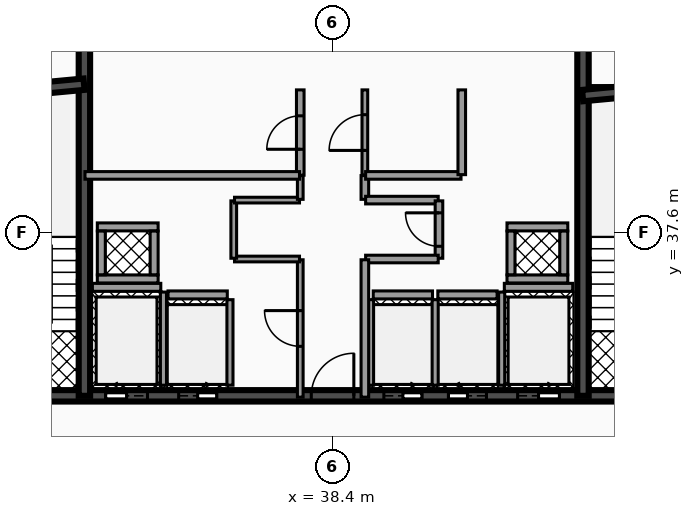
"""IFC4 building model, lengths in metres.
Left out: names, types, materials, properties, quantities, classifications, styles, units other than length and angle.
Written with IfcOpenShell. Run it as: python <this file> out.ifc"""

import sys

from ifc_helpers import new_model, si_unit, direction, frame, frame_2d, origin, place, context, subcontext, project, spatial, rectangle, extrude, element, fill, save


model = new_model("IFC4")
c1 = context("Model", 3, precision=1e-05, world=origin(), true_north=direction((0.0, 1.0)))
c2 = subcontext(c1, "Body", "Model", "MODEL_VIEW")
j1 = project(units=[si_unit("LENGTHUNIT", "METRE"), si_unit("PLANEANGLEUNIT", "RADIAN")], contexts=[c1])
p1 = place(None, origin())
s1 = spatial("IfcSite", under=j1, at=p1, CompositionType="ELEMENT")
p2 = place(p1, origin())
s2 = spatial("IfcBuilding", under=s1, at=p2, CompositionType="ELEMENT")
p3 = place(p2, frame((0.0, 0.0, 289.0)))
s3 = spatial("IfcBuildingStorey", under=s2, at=p3, CompositionType="ELEMENT", Elevation=289.0)
p4 = place(p3, frame((28.5, 33.3, 0.0), z_axis=(0.0, 0.0, 1.0), x_axis=(1.0, 0.0, 0.0)))
e1 = element("IfcWall", 1, at=p4, inside=s3, PredefinedType="SHEAR", context=c2, shape_type="SweptSolid", body=[
    extrude(rectangle(XDim=19.86, YDim=0.3, at=frame_2d((9.93, 0.0))), origin(), (0.0, 0.0, 1.0), 3.18),
])
p5 = place(p4, frame((3.93, 0.0, 0.0)))
e2 = element("IfcOpeningElement", 2, at=p5, cuts=e1, PredefinedType="OPENING", context=c2, shape_type="SweptSolid", body=[
    extrude(rectangle(XDim=1.1, YDim=2.15, at=frame_2d((0.55, 1.075))), frame((0.0, 0.16, 0.0), z_axis=(0.0, -1.0, 0.0), x_axis=(1.0, 0.0, 0.0)), (0.0, 0.0, 1.0), 0.32),
])
p6 = place(p4, frame((14.77, 0.0, 0.0)))
e3 = element("IfcOpeningElement", 3, at=p6, cuts=e1, PredefinedType="OPENING", context=c2, shape_type="SweptSolid", body=[
    extrude(rectangle(XDim=1.1, YDim=2.15, at=frame_2d((0.55, 1.075))), frame((0.0, 0.16, 0.0), z_axis=(0.0, -1.0, 0.0), x_axis=(1.0, 0.0, 0.0)), (0.0, 0.0, 1.0), 0.32),
])
p7 = place(p4, frame((11.25, 0.0, 0.0)))
e4 = element("IfcOpeningElement", 4, at=p7, cuts=e1, PredefinedType="OPENING", context=c2, shape_type="SweptSolid", body=[
    extrude(rectangle(XDim=1.0, YDim=2.1, at=frame_2d((0.5, 1.05))), frame((0.0, 0.16, 0.0), z_axis=(0.0, -1.0, 0.0), x_axis=(1.0, 0.0, 0.0)), (0.0, 0.0, 1.0), 0.32),
])
p8 = place(p4, frame((12.95, 0.0, 0.0)))
e5 = element("IfcOpeningElement", 5, at=p8, cuts=e1, PredefinedType="OPENING", context=c2, shape_type="SweptSolid", body=[
    extrude(rectangle(XDim=1.0, YDim=2.1, at=frame_2d((0.5, 1.05))), frame((0.0, 0.16, 0.0), z_axis=(0.0, -1.0, 0.0), x_axis=(1.0, 0.0, 0.0)), (0.0, 0.0, 1.0), 0.32),
])
p9 = place(p4, frame((5.85, 0.0, 0.0)))
e6 = element("IfcOpeningElement", 6, at=p9, cuts=e1, PredefinedType="OPENING", context=c2, shape_type="SweptSolid", body=[
    extrude(rectangle(XDim=1.0, YDim=2.1, at=frame_2d((0.5, 1.05))), frame((0.0, 0.16, 0.0), z_axis=(0.0, -1.0, 0.0), x_axis=(1.0, 0.0, 0.0)), (0.0, 0.0, 1.0), 0.32),
])
p10 = place(p4, frame((1.21, 0.0, 0.0)))
e7 = element("IfcOpeningElement", 7, at=p10, cuts=e1, PredefinedType="OPENING", context=c2, shape_type="SweptSolid", body=[
    extrude(rectangle(XDim=1.1, YDim=2.2, at=frame_2d((0.55, 1.1))), frame((0.0, 0.16, 0.0), z_axis=(0.0, -1.0, 0.0), x_axis=(1.0, 0.0, 0.0)), (0.0, 0.0, 1.0), 0.32),
])
p11 = place(p4, frame((9.34, 0.0, 0.0)))
e8 = element("IfcOpeningElement", 8, at=p11, cuts=e1, PredefinedType="OPENING", context=c2, shape_type="SweptSolid", body=[
    extrude(rectangle(XDim=1.12, YDim=2.05, at=frame_2d((0.56, 1.025))), frame((0.0, 0.16, 0.0), z_axis=(0.0, -1.0, 0.0), x_axis=(1.0, 0.0, 0.0)), (0.0, 0.0, 1.0), 0.32),
])
p12 = place(p4, frame((17.55, 0.0, 0.0)))
e9 = element("IfcOpeningElement", 9, at=p12, cuts=e1, PredefinedType="OPENING", context=c2, shape_type="SweptSolid", body=[
    extrude(rectangle(XDim=1.1, YDim=2.2, at=frame_2d((0.55, 1.1))), frame((0.0, 0.16, 0.0), z_axis=(0.0, -1.0, 0.0), x_axis=(1.0, 0.0, 0.0)), (0.0, 0.0, 1.0), 0.32),
])
for number, where, z_axis, x_axis in (
    (10, (31.87, 33.3, 0.0), (0.0, 0.0, 1.0), (0.0, 1.0, 0.0)),
    (11, (44.99, 33.3, 0.0), (0.0, 0.0, 1.0), (0.0, 1.0, 0.0)),
):
    element("IfcWall", number, at=place(p3, frame(where, z_axis=z_axis, x_axis=x_axis)), inside=s3, PredefinedType="SHEAR", context=c2, shape_type="SweptSolid", body=[
        extrude(rectangle(XDim=10.1, YDim=0.3, at=frame_2d((5.05, 0.0))), origin(), (0.0, 0.0, 1.0), 3.18),
    ])
p13 = place(p3, frame((28.64, 41.2, 0.0), z_axis=(0.0, 0.0, 1.0), x_axis=(0.995687118776, 0.092774789157, 0.0)))
e12 = element("IfcWall", 12, at=p13, inside=s3, PredefinedType="SHEAR", context=c2, shape_type="SweptSolid", body=[
    extrude(rectangle(XDim=3.234, YDim=0.3, at=frame_2d((1.617, 0.0))), origin(), (0.0, 0.0, 1.0), 3.18),
])
p14 = place(p3, frame((44.98, 41.2, 0.0), z_axis=(0.0, 0.0, 1.0), x_axis=(0.995686468965, 0.09278176286, 0.0)))
e13 = element("IfcWall", 13, at=p14, inside=s3, PredefinedType="SHEAR", context=c2, shape_type="SweptSolid", body=[
    extrude(rectangle(XDim=3.234, YDim=0.3, at=frame_2d((1.617, 0.0))), origin(), (0.0, 0.0, 1.0), 3.18),
])
p15 = place(p3, frame((32.08, 36.155, 0.0), z_axis=(0.0, 0.0, 1.0), x_axis=(1.0, 0.0, 0.0)))
e14 = element("IfcWall", 14, at=p15, inside=s3, PredefinedType="SOLIDWALL", context=c2, shape_type="SweptSolid", body=[
    extrude(rectangle(XDim=1.8, YDim=0.21, at=frame_2d((0.9, 0.0))), origin(), (0.0, 0.0, 1.0), 3.18),
])
p16 = place(p3, frame((33.95, 33.58, 0.0), z_axis=(0.0, 0.0, 1.0), x_axis=(0.0, 1.0, 0.0)))
e15 = element("IfcWall", 15, at=p16, inside=s3, PredefinedType="SOLIDWALL", context=c2, shape_type="SweptSolid", body=[
    extrude(rectangle(XDim=2.45, YDim=0.16, at=frame_2d((1.225, 0.0))), origin(), (0.0, 0.0, 1.0), 3.18),
])
p17 = place(p3, frame((42.92, 36.155, 0.0), z_axis=(0.0, 0.0, 1.0), x_axis=(1.0, 0.0, 0.0)))
e16 = element("IfcWall", 16, at=p17, inside=s3, PredefinedType="SOLIDWALL", context=c2, shape_type="SweptSolid", body=[
    extrude(rectangle(XDim=1.8, YDim=0.21, at=frame_2d((0.9, 0.0))), origin(), (0.0, 0.0, 1.0), 3.18),
])
p18 = place(p3, frame((42.85, 33.58, 0.0), z_axis=(0.0, 0.0, 1.0), x_axis=(0.0, 1.0, 0.0)))
e17 = element("IfcWall", 17, at=p18, inside=s3, PredefinedType="SOLIDWALL", context=c2, shape_type="SweptSolid", body=[
    extrude(rectangle(XDim=2.45, YDim=0.16, at=frame_2d((1.225, 0.0))), origin(), (0.0, 0.0, 1.0), 3.18),
])
p19 = place(p3, frame((39.47, 35.955, 0.0), z_axis=(0.0, 0.0, 1.0), x_axis=(1.0, 0.0, 0.0)))
e18 = element("IfcWall", 18, at=p19, inside=s3, PredefinedType="SOLIDWALL", context=c2, shape_type="SweptSolid", body=[
    extrude(rectangle(XDim=1.56, YDim=0.21, at=frame_2d((0.78, 0.0))), origin(), (0.0, 0.0, 1.0), 3.18),
])
for number, where, z_axis, x_axis in (
    (19, (39.4, 33.58, 0.0), (0.0, 0.0, 1.0), (0.0, 1.0, 0.0)),
    (20, (41.1, 33.58, 0.0), (0.0, 0.0, 1.0), (0.0, 1.0, 0.0)),
):
    element("IfcWall", number, at=place(p3, frame(where, z_axis=z_axis, x_axis=x_axis)), inside=s3, PredefinedType="SOLIDWALL", context=c2, shape_type="SweptSolid", body=[
        extrude(rectangle(XDim=2.25, YDim=0.16, at=frame_2d((1.125, 0.0))), origin(), (0.0, 0.0, 1.0), 3.18),
    ])
p20 = place(p3, frame((41.17, 35.955, 0.0), z_axis=(0.0, 0.0, 1.0), x_axis=(1.0, 0.0, 0.0)))
e21 = element("IfcWall", 21, at=p20, inside=s3, PredefinedType="SOLIDWALL", context=c2, shape_type="SweptSolid", body=[
    extrude(rectangle(XDim=1.56, YDim=0.21, at=frame_2d((0.78, 0.0))), origin(), (0.0, 0.0, 1.0), 3.18),
])
p21 = place(p3, frame((34.07, 35.955, 0.0), z_axis=(0.0, 0.0, 1.0), x_axis=(1.0, 0.0, 0.0)))
e22 = element("IfcWall", 22, at=p21, inside=s3, PredefinedType="SOLIDWALL", context=c2, shape_type="SweptSolid", body=[
    extrude(rectangle(XDim=1.56, YDim=0.21, at=frame_2d((0.78, 0.0))), origin(), (0.0, 0.0, 1.0), 3.18),
])
p22 = place(p3, frame((35.7, 33.58, 0.0), z_axis=(0.0, 0.0, 1.0), x_axis=(0.0, 1.0, 0.0)))
e23 = element("IfcWall", 23, at=p22, inside=s3, PredefinedType="SOLIDWALL", context=c2, shape_type="SweptSolid", body=[
    extrude(rectangle(XDim=2.25, YDim=0.16, at=frame_2d((1.125, 0.0))), origin(), (0.0, 0.0, 1.0), 3.18),
])
for number, where, z_axis, x_axis in (
    (24, (32.21, 36.375, 0.0), (0.0, 0.0, 1.0), (1.0, 0.0, 0.0)),
    (25, (32.21, 37.745, 0.0), (0.0, 0.0, 1.0), (1.0, 0.0, 0.0)),
):
    element("IfcWall", number, at=place(p3, frame(where, z_axis=z_axis, x_axis=x_axis)), inside=s3, PredefinedType="SOLIDWALL", context=c2, shape_type="SweptSolid", body=[
        extrude(rectangle(XDim=1.6, YDim=0.21, at=frame_2d((0.8, 0.0))), origin(), (0.0, 0.0, 1.0), 3.18),
    ])
for number, where, z_axis, x_axis in (
    (26, (32.315, 36.485, 0.0), (0.0, 0.0, 1.0), (0.0, 1.0, 0.0)),
    (27, (33.705, 36.485, 0.0), (0.0, 0.0, 1.0), (0.0, 1.0, 0.0)),
):
    element("IfcWall", number, at=place(p3, frame(where, z_axis=z_axis, x_axis=x_axis)), inside=s3, PredefinedType="SOLIDWALL", context=c2, shape_type="SweptSolid", body=[
        extrude(rectangle(XDim=1.15, YDim=0.21, at=frame_2d((0.575, 0.0))), origin(), (0.0, 0.0, 1.0), 3.18),
    ])
for number, where, z_axis, x_axis in (
    (28, (42.99, 36.375, 0.0), (0.0, 0.0, 1.0), (1.0, 0.0, 0.0)),
    (29, (42.99, 37.745, 0.0), (0.0, 0.0, 1.0), (1.0, 0.0, 0.0)),
):
    element("IfcWall", number, at=place(p3, frame(where, z_axis=z_axis, x_axis=x_axis)), inside=s3, PredefinedType="SOLIDWALL", context=c2, shape_type="SweptSolid", body=[
        extrude(rectangle(XDim=1.6, YDim=0.21, at=frame_2d((0.8, 0.0))), origin(), (0.0, 0.0, 1.0), 3.18),
    ])
for number, where, z_axis, x_axis in (
    (30, (43.095, 36.485, 0.0), (0.0, 0.0, 1.0), (0.0, 1.0, 0.0)),
    (31, (44.485, 36.485, 0.0), (0.0, 0.0, 1.0), (0.0, 1.0, 0.0)),
):
    element("IfcWall", number, at=place(p3, frame(where, z_axis=z_axis, x_axis=x_axis)), inside=s3, PredefinedType="SOLIDWALL", context=c2, shape_type="SweptSolid", body=[
        extrude(rectangle(XDim=1.15, YDim=0.21, at=frame_2d((0.575, 0.0))), origin(), (0.0, 0.0, 1.0), 3.18),
    ])
p23 = place(p3, frame((37.55, 33.265, 0.0), z_axis=(0.0, 0.0, 1.0), x_axis=(0.0, 1.0, 0.0)))
e32 = element("IfcWall", 32, at=p23, inside=s3, PredefinedType="PARTITIONING", context=c2, shape_type="SweptSolid", body=[
    extrude(rectangle(XDim=3.615, YDim=0.15, at=frame_2d((1.808, 0.0))), origin(), (0.0, 0.0, 1.0), 2.235),
])
p24 = place(p23, frame((1.337, 0.0, 0.0)))
e33 = element("IfcOpeningElement", 33, at=p24, cuts=e32, PredefinedType="OPENING", context=c2, shape_type="SweptSolid", body=[
    extrude(rectangle(XDim=0.94, YDim=2.05, at=frame_2d((0.47, 1.025))), frame((0.0, 0.085, 0.0), z_axis=(0.0, -1.0, 0.0), x_axis=(1.0, 0.0, 0.0)), (0.0, 0.0, 1.0), 0.17),
])
p25 = place(p3, frame((35.82, 36.9, 0.0), z_axis=(0.0, 0.0, 1.0), x_axis=(1.0, 0.0, 0.0)))
e34 = element("IfcWall", 34, at=p25, inside=s3, PredefinedType="PARTITIONING", context=c2, shape_type="SweptSolid", body=[
    extrude(rectangle(XDim=1.71, YDim=0.15, at=frame_2d((0.855, 0.0))), origin(), (0.0, 0.0, 1.0), 2.235),
])
p26 = place(p3, frame((35.8, 36.92, 0.0), z_axis=(0.0, 0.0, 1.0), x_axis=(0.0, 1.0, 0.0)))
e35 = element("IfcWall", 35, at=p26, inside=s3, PredefinedType="PARTITIONING", context=c2, shape_type="SweptSolid", body=[
    extrude(rectangle(XDim=1.51, YDim=0.15, at=frame_2d((0.755, 0.0))), origin(), (0.0, 0.0, 1.0), 2.235),
])
p27 = place(p3, frame((35.82, 38.45, 0.0), z_axis=(0.0, 0.0, 1.0), x_axis=(1.0, 0.0, 0.0)))
e36 = element("IfcWall", 36, at=p27, inside=s3, PredefinedType="PARTITIONING", context=c2, shape_type="SweptSolid", body=[
    extrude(rectangle(XDim=1.71, YDim=0.15, at=frame_2d((0.855, 0.0))), origin(), (0.0, 0.0, 1.0), 2.235),
])
p28 = place(p3, frame((37.55, 38.47, 0.0), z_axis=(0.0, 0.0, 1.0), x_axis=(0.0, 1.0, 0.0)))
e37 = element("IfcWall", 37, at=p28, inside=s3, PredefinedType="PARTITIONING", context=c2, shape_type="SweptSolid", body=[
    extrude(rectangle(XDim=0.625, YDim=0.15, at=frame_2d((0.312, 0.0))), origin(), (0.0, 0.0, 1.0), 2.235),
])
p29 = place(p3, frame((37.55, 39.105, 0.0), z_axis=(0.0, 0.0, 1.0), x_axis=(0.0, 1.0, 0.0)))
e38 = element("IfcWall", 38, at=p29, inside=s3, PredefinedType="PARTITIONING", context=c2, shape_type="SweptSolid", body=[
    extrude(rectangle(XDim=2.245, YDim=0.2, at=frame_2d((1.123, 0.0))), origin(), (0.0, 0.0, 1.0), 2.235),
])
p30 = place(p29, frame((0.683, 0.0, 0.0)))
e39 = element("IfcOpeningElement", 39, at=p30, cuts=e38, PredefinedType="OPENING", context=c2, shape_type="SweptSolid", body=[
    extrude(rectangle(XDim=0.88, YDim=2.05, at=frame_2d((0.44, 1.025))), frame((0.0, 0.11, 0.0), z_axis=(0.0, -1.0, 0.0), x_axis=(1.0, 0.0, 0.0)), (0.0, 0.0, 1.0), 0.22),
])
p31 = place(p3, frame((39.25, 38.47, 0.0), z_axis=(0.0, 0.0, 1.0), x_axis=(0.0, 1.0, 0.0)))
e40 = element("IfcWall", 40, at=p31, inside=s3, PredefinedType="PARTITIONING", context=c2, shape_type="SweptSolid", body=[
    extrude(rectangle(XDim=0.625, YDim=0.2, at=frame_2d((0.312, 0.0))), origin(), (0.0, 0.0, 1.0), 2.235),
])
p32 = place(p3, frame((39.27, 38.45, 0.0), z_axis=(0.0, 0.0, 1.0), x_axis=(1.0, 0.0, 0.0)))
e41 = element("IfcWall", 41, at=p32, inside=s3, PredefinedType="PARTITIONING", context=c2, shape_type="SweptSolid", body=[
    extrude(rectangle(XDim=1.91, YDim=0.2, at=frame_2d((0.955, 0.0))), origin(), (0.0, 0.0, 1.0), 2.235),
])
p33 = place(p3, frame((41.2, 36.92, 0.0), z_axis=(0.0, 0.0, 1.0), x_axis=(0.0, 1.0, 0.0)))
e42 = element("IfcWall", 42, at=p33, inside=s3, PredefinedType="PARTITIONING", context=c2, shape_type="SweptSolid", body=[
    extrude(rectangle(XDim=1.51, YDim=0.2, at=frame_2d((0.755, 0.0))), origin(), (0.0, 0.0, 1.0), 2.235),
])
p34 = place(p33, frame((0.315, 0.0, 0.0)))
e43 = element("IfcOpeningElement", 43, at=p34, cuts=e42, PredefinedType="OPENING", context=c2, shape_type="SweptSolid", body=[
    extrude(rectangle(XDim=0.88, YDim=2.05, at=frame_2d((0.44, 1.025))), frame((0.0, 0.11, 0.0), z_axis=(0.0, -1.0, 0.0), x_axis=(1.0, 0.0, 0.0)), (0.0, 0.0, 1.0), 0.22),
])
p35 = place(p3, frame((39.27, 36.9, 0.0), z_axis=(0.0, 0.0, 1.0), x_axis=(1.0, 0.0, 0.0)))
e44 = element("IfcWall", 44, at=p35, inside=s3, PredefinedType="PARTITIONING", context=c2, shape_type="SweptSolid", body=[
    extrude(rectangle(XDim=1.91, YDim=0.2, at=frame_2d((0.955, 0.0))), origin(), (0.0, 0.0, 1.0), 2.235),
])
p36 = place(p3, frame((39.25, 33.265, 0.0), z_axis=(0.0, 0.0, 1.0), x_axis=(0.0, 1.0, 0.0)))
e45 = element("IfcWall", 45, at=p36, inside=s3, PredefinedType="PARTITIONING", context=c2, shape_type="SweptSolid", body=[
    extrude(rectangle(XDim=3.615, YDim=0.2, at=frame_2d((1.808, 0.0))), origin(), (0.0, 0.0, 1.0), 2.235),
])
p37 = place(p3, frame((39.25, 39.105, 0.0), z_axis=(0.0, 0.0, 1.0), x_axis=(0.0, 1.0, 0.0)))
e46 = element("IfcWall", 46, at=p37, inside=s3, PredefinedType="PARTITIONING", context=c2, shape_type="SweptSolid", body=[
    extrude(rectangle(XDim=2.245, YDim=0.15, at=frame_2d((1.123, 0.0))), origin(), (0.0, 0.0, 1.0), 2.235),
])
p38 = place(p37, frame((0.653, 0.0, 0.0)))
e47 = element("IfcOpeningElement", 47, at=p38, cuts=e46, PredefinedType="OPENING", context=c2, shape_type="SweptSolid", body=[
    extrude(rectangle(XDim=0.94, YDim=2.05, at=frame_2d((0.47, 1.025))), frame((0.0, 0.085, 0.0), z_axis=(0.0, -1.0, 0.0), x_axis=(1.0, 0.0, 0.0)), (0.0, 0.0, 1.0), 0.17),
])
p39 = place(p3, frame((31.885, 39.1, 0.0), z_axis=(0.0, 0.0, 1.0), x_axis=(1.0, 0.0, 0.0)))
e48 = element("IfcWall", 48, at=p39, inside=s3, PredefinedType="PARTITIONING", context=c2, shape_type="SweptSolid", body=[
    extrude(rectangle(XDim=5.645, YDim=0.2, at=frame_2d((2.823, 0.0))), origin(), (0.0, 0.0, 1.0), 2.235),
])
p40 = place(p3, frame((39.27, 39.1, 0.0), z_axis=(0.0, 0.0, 1.0), x_axis=(1.0, 0.0, 0.0)))
e49 = element("IfcWall", 49, at=p40, inside=s3, PredefinedType="PARTITIONING", context=c2, shape_type="SweptSolid", body=[
    extrude(rectangle(XDim=2.51, YDim=0.2, at=frame_2d((1.255, 0.0))), origin(), (0.0, 0.0, 1.0), 2.235),
])
p41 = place(p3, frame((41.8, 39.12, 0.0), z_axis=(0.0, 0.0, 1.0), x_axis=(0.0, 1.0, 0.0)))
e50 = element("IfcWall", 50, at=p41, inside=s3, PredefinedType="PARTITIONING", context=c2, shape_type="SweptSolid", body=[
    extrude(rectangle(XDim=2.23, YDim=0.2, at=frame_2d((1.115, 0.0))), origin(), (0.0, 0.0, 1.0), 2.235),
])
p42 = place(p5, origin())
e51 = element("IfcDoor", 51, at=p42, inside=s3, OperationType="SLIDING_TO_LEFT", PredefinedType="DOOR", context=c2, shape_type="SweptSolid", body=[
    extrude(rectangle(XDim=1.1, YDim=2.15, at=frame_2d((0.55, 1.075))), frame((0.0, 0.025, 0.0), z_axis=(0.0, -1.0, 0.0), x_axis=(1.0, 0.0, 0.0)), (0.0, 0.0, 1.0), 0.05),
])
fill(e2, e51)
p43 = place(p6, origin())
e52 = element("IfcDoor", 52, at=p43, inside=s3, OperationType="SLIDING_TO_RIGHT", PredefinedType="DOOR", context=c2, shape_type="SweptSolid", body=[
    extrude(rectangle(XDim=1.1, YDim=2.15, at=frame_2d((0.55, 1.075))), frame((0.0, 0.025, 0.0), z_axis=(0.0, -1.0, 0.0), x_axis=(1.0, 0.0, 0.0)), (0.0, 0.0, 1.0), 0.05),
])
fill(e3, e52)
p44 = place(p7, origin())
e53 = element("IfcDoor", 53, at=p44, inside=s3, OperationType="SLIDING_TO_RIGHT", PredefinedType="DOOR", context=c2, shape_type="SweptSolid", body=[
    extrude(rectangle(XDim=1.0, YDim=2.1, at=frame_2d((0.5, 1.05))), frame((0.0, 0.025, 0.0), z_axis=(0.0, -1.0, 0.0), x_axis=(1.0, 0.0, 0.0)), (0.0, 0.0, 1.0), 0.05),
])
fill(e4, e53)
p45 = place(p8, origin())
e54 = element("IfcDoor", 54, at=p45, inside=s3, OperationType="SLIDING_TO_LEFT", PredefinedType="DOOR", context=c2, shape_type="SweptSolid", body=[
    extrude(rectangle(XDim=1.0, YDim=2.1, at=frame_2d((0.5, 1.05))), frame((0.0, 0.025, 0.0), z_axis=(0.0, -1.0, 0.0), x_axis=(1.0, 0.0, 0.0)), (0.0, 0.0, 1.0), 0.05),
])
fill(e5, e54)
p46 = place(p9, origin())
e55 = element("IfcDoor", 55, at=p46, inside=s3, OperationType="SLIDING_TO_RIGHT", PredefinedType="DOOR", context=c2, shape_type="SweptSolid", body=[
    extrude(rectangle(XDim=1.0, YDim=2.1, at=frame_2d((0.5, 1.05))), frame((0.0, 0.025, 0.0), z_axis=(0.0, -1.0, 0.0), x_axis=(1.0, 0.0, 0.0)), (0.0, 0.0, 1.0), 0.05),
])
fill(e6, e55)
p47 = place(p11, origin())
e56 = element("IfcDoor", 56, at=p47, inside=s3, OperationType="SINGLE_SWING_RIGHT", PredefinedType="DOOR", context=c2, shape_type="SweptSolid", body=[
    extrude(rectangle(XDim=1.12, YDim=2.05, at=frame_2d((0.56, 1.025))), frame((0.0, 0.025, 0.0), z_axis=(0.0, -1.0, 0.0), x_axis=(1.0, 0.0, 0.0)), (0.0, 0.0, 1.0), 0.05),
])
fill(e8, e56)
p48 = place(p24, origin())
e57 = element("IfcDoor", 57, at=p48, inside=s3, OperationType="SINGLE_SWING_RIGHT", PredefinedType="DOOR", context=c2, shape_type="SweptSolid", body=[
    extrude(rectangle(XDim=0.94, YDim=2.05, at=frame_2d((0.47, 1.025))), frame((0.0, 0.025, 0.0), z_axis=(0.0, -1.0, 0.0), x_axis=(1.0, 0.0, 0.0)), (0.0, 0.0, 1.0), 0.05),
])
fill(e33, e57)
p49 = place(p30, origin())
e58 = element("IfcDoor", 58, at=p49, inside=s3, OperationType="SINGLE_SWING_LEFT", PredefinedType="DOOR", context=c2, shape_type="SweptSolid", body=[
    extrude(rectangle(XDim=0.88, YDim=2.05, at=frame_2d((0.44, 1.025))), frame((0.0, 0.025, 0.0), z_axis=(0.0, -1.0, 0.0), x_axis=(1.0, 0.0, 0.0)), (0.0, 0.0, 1.0), 0.05),
])
fill(e39, e58)
p50 = place(p34, origin())
e59 = element("IfcDoor", 59, at=p50, inside=s3, OperationType="SINGLE_SWING_RIGHT", PredefinedType="DOOR", context=c2, shape_type="SweptSolid", body=[
    extrude(rectangle(XDim=0.88, YDim=2.05, at=frame_2d((0.44, 1.025))), frame((0.0, 0.025, 0.0), z_axis=(0.0, -1.0, 0.0), x_axis=(1.0, 0.0, 0.0)), (0.0, 0.0, 1.0), 0.05),
])
fill(e43, e59)
p51 = place(p38, origin())
e60 = element("IfcDoor", 60, at=p51, inside=s3, OperationType="SINGLE_SWING_LEFT", PredefinedType="DOOR", context=c2, shape_type="SweptSolid", body=[
    extrude(rectangle(XDim=0.94, YDim=2.05, at=frame_2d((0.47, 1.025))), frame((0.0, 0.025, 0.0), z_axis=(0.0, -1.0, 0.0), x_axis=(1.0, 0.0, 0.0)), (0.0, 0.0, 1.0), 0.05),
])
fill(e47, e60)
save(model, sys.argv[1])
